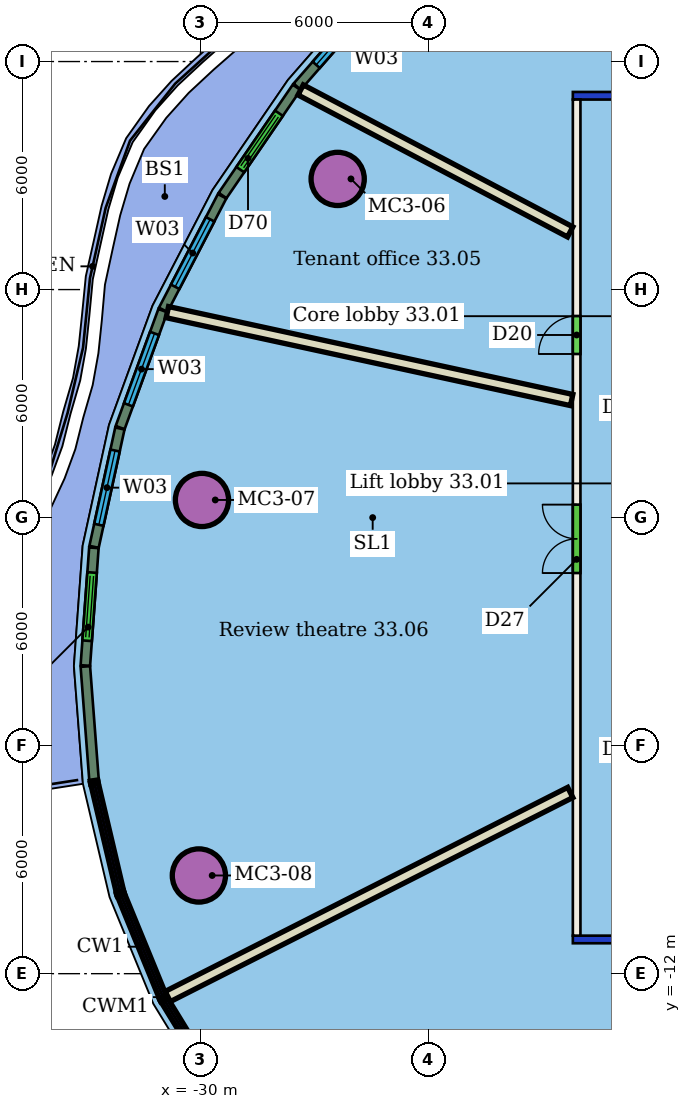
"""IFC4 building model, lengths in metres.
Left out: names, types, materials, properties, quantities, classifications, styles, units other than length and angle.
Written with IfcOpenShell. Run it as: python <this file> out.ifc"""

import sys

from ifc_helpers import new_model, si_unit, direction, frame, frame_2d, origin, origin_2d, place, context, subcontext, project, spatial, rectangle, hollow_circle, extrude, element, fill, save


model = new_model("IFC4")
c1 = context("Model", 3, precision=1e-05, world=origin(), true_north=direction((0.0, 1.0)))
c2 = subcontext(c1, "Body", "Model", "MODEL_VIEW")
j1 = project(units=[si_unit("LENGTHUNIT", "METRE"), si_unit("PLANEANGLEUNIT", "RADIAN")], contexts=[c1])
p1 = place(None, origin())
s1 = spatial("IfcSite", under=j1, at=p1, CompositionType="ELEMENT")
p2 = place(p1, origin())
s2 = spatial("IfcBuilding", under=s1, at=p2, CompositionType="ELEMENT")
p3 = place(p2, frame((0.0, 0.0, 143.4)))
s3 = spatial("IfcBuildingStorey", under=s2, at=p3, CompositionType="ELEMENT", Elevation=143.4)
for number, where, z_axis, x_axis in (
    (1, (-26.388, 8.912, 0.0), (0.0, 0.0, 1.0), (1.0, 0.0, 0.0)),
    (2, (-29.959, 0.464, 0.0), (0.0, 0.0, 1.0), (1.0, 0.0, 0.0)),
    (3, (-30.041, -9.417, 0.0), (0.0, 0.0, 1.0), (1.0, 0.0, 0.0)),
):
    element("IfcColumn", number, at=place(p3, frame(where, z_axis=z_axis, x_axis=x_axis)), inside=s3, PredefinedType="COLUMN", context=c2, shape_type="SweptSolid", body=[
        extrude(hollow_circle(Radius=0.7, WallThickness=0.05, at=origin_2d()), origin(), (0.0, 0.0, 1.0), 3.45),
    ])
p4 = place(p3, frame((8.2, -11.1, 0.0), z_axis=(0.0, 0.0, 1.0), x_axis=(-1.0, 0.0, 0.0)))
e4 = element("IfcWall", 4, at=p4, inside=s3, PredefinedType="PARTITIONING", context=c2, shape_type="SweptSolid", body=[
    extrude(rectangle(XDim=28.4, YDim=0.2, at=frame_2d((14.2, 0.0))), origin(), (0.0, 0.0, 1.0), 3.05),
])
p5 = place(p4, frame((22.856, 0.0, 0.0)))
e5 = element("IfcOpeningElement", 5, at=p5, cuts=e4, PredefinedType="OPENING", context=c2, shape_type="SweptSolid", body=[
    extrude(rectangle(XDim=1.8, YDim=2.1, at=frame_2d((0.9, 1.05))), frame((0.0, 0.11, 0.0), z_axis=(0.0, -1.0, 0.0), x_axis=(1.0, 0.0, 0.0)), (0.0, 0.0, 1.0), 0.22),
])
p6 = place(p4, frame((17.594, 0.0, 0.0)))
e6 = element("IfcOpeningElement", 6, at=p6, cuts=e4, PredefinedType="OPENING", context=c2, shape_type="SweptSolid", body=[
    extrude(rectangle(XDim=0.9, YDim=2.1, at=frame_2d((0.45, 1.05))), frame((0.0, 0.11, 0.0), z_axis=(0.0, -1.0, 0.0), x_axis=(1.0, 0.0, 0.0)), (0.0, 0.0, 1.0), 0.22),
])
p7 = place(p4, frame((7.819, 0.0, 0.0)))
e7 = element("IfcOpeningElement", 7, at=p7, cuts=e4, PredefinedType="OPENING", context=c2, shape_type="SweptSolid", body=[
    extrude(rectangle(XDim=1.2, YDim=2.1, at=frame_2d((0.6, 1.05))), frame((0.0, 0.11, 0.0), z_axis=(0.0, -1.0, 0.0), x_axis=(1.0, 0.0, 0.0)), (0.0, 0.0, 1.0), 0.22),
])
p8 = place(p3, frame((-20.1, -11.0, 0.0), z_axis=(0.0, 0.0, 1.0), x_axis=(0.0, 1.0, 0.0)))
e8 = element("IfcWall", 8, at=p8, inside=s3, PredefinedType="PARTITIONING", context=c2, shape_type="SweptSolid", body=[
    extrude(rectangle(XDim=22.0, YDim=0.2, at=frame_2d((11.0, 0.0))), origin(), (0.0, 0.0, 1.0), 3.45),
])
p9 = place(p8, frame((15.305, 0.0, 0.0)))
e9 = element("IfcOpeningElement", 9, at=p9, cuts=e8, PredefinedType="OPENING", context=c2, shape_type="SweptSolid", body=[
    extrude(rectangle(XDim=1.0, YDim=2.1, at=frame_2d((0.5, 1.05))), frame((0.0, 0.11, 0.0), z_axis=(0.0, -1.0, 0.0), x_axis=(1.0, 0.0, 0.0)), (0.0, 0.0, 1.0), 0.22),
])
p10 = place(p8, frame((9.542, 0.0, 0.0)))
e10 = element("IfcOpeningElement", 10, at=p10, cuts=e8, PredefinedType="OPENING", context=c2, shape_type="SweptSolid", body=[
    extrude(rectangle(XDim=1.8, YDim=2.4, at=frame_2d((0.9, 1.2))), frame((0.0, 0.11, 0.0), z_axis=(0.0, -1.0, 0.0), x_axis=(1.0, 0.0, 0.0)), (0.0, 0.0, 1.0), 0.22),
])
p11 = place(p3, frame((-20.2, 11.1, 0.0), z_axis=(0.0, 0.0, 1.0), x_axis=(1.0, 0.0, 0.0)))
e11 = element("IfcWall", 11, at=p11, inside=s3, PredefinedType="PARTITIONING", context=c2, shape_type="SweptSolid", body=[
    extrude(rectangle(XDim=28.4, YDim=0.2, at=frame_2d((14.2, 0.0))), origin(), (0.0, 0.0, 1.0), 3.05),
])
p12 = place(p11, frame((20.641, 0.0, 0.0)))
e12 = element("IfcOpeningElement", 12, at=p12, cuts=e11, PredefinedType="OPENING", context=c2, shape_type="SweptSolid", body=[
    extrude(rectangle(XDim=1.1, YDim=2.1, at=frame_2d((0.55, 1.05))), frame((0.0, 0.11, 0.0), z_axis=(0.0, -1.0, 0.0), x_axis=(1.0, 0.0, 0.0)), (0.0, 0.0, 1.0), 0.22),
])
p13 = place(p11, frame((12.589, 0.0, 0.0)))
e13 = element("IfcOpeningElement", 13, at=p13, cuts=e11, PredefinedType="OPENING", context=c2, shape_type="SweptSolid", body=[
    extrude(rectangle(XDim=1.0, YDim=2.1, at=frame_2d((0.5, 1.05))), frame((0.0, 0.11, 0.0), z_axis=(0.0, -1.0, 0.0), x_axis=(1.0, 0.0, 0.0)), (0.0, 0.0, 1.0), 0.22),
])
p14 = place(p11, frame((8.211, 0.0, 0.0)))
e14 = element("IfcOpeningElement", 14, at=p14, cuts=e11, PredefinedType="OPENING", context=c2, shape_type="SweptSolid", body=[
    extrude(rectangle(XDim=1.2, YDim=2.1, at=frame_2d((0.6, 1.05))), frame((0.0, 0.11, 0.0), z_axis=(0.0, -1.0, 0.0), x_axis=(1.0, 0.0, 0.0)), (0.0, 0.0, 1.0), 0.22),
])
p15 = place(p11, frame((3.191, 0.0, 0.0)))
e15 = element("IfcOpeningElement", 15, at=p15, cuts=e11, PredefinedType="OPENING", context=c2, shape_type="SweptSolid", body=[
    extrude(rectangle(XDim=1.2, YDim=2.1, at=frame_2d((0.6, 1.05))), frame((0.0, 0.11, 0.0), z_axis=(0.0, -1.0, 0.0), x_axis=(1.0, 0.0, 0.0)), (0.0, 0.0, 1.0), 0.22),
])
p16 = place(p3, frame((-19.456, 18.479, 0.0), z_axis=(0.0, 0.0, 1.0), x_axis=(0.588675883511, -0.808369163299, 0.0)))
e16 = element("IfcWall", 16, at=p16, inside=s3, PredefinedType="PARTITIONING", context=c2, shape_type="SweptSolid", body=[
    extrude(rectangle(XDim=8.895, YDim=0.3, at=frame_2d((4.447, 0.0))), origin(), (0.0, 0.0, 1.0), 3.45),
])
p17 = place(p3, frame((-27.362, 11.254, 0.0), z_axis=(0.0, 0.0, 1.0), x_axis=(0.884735817221, -0.466092838098, 0.0)))
e17 = element("IfcWall", 17, at=p17, inside=s3, PredefinedType="PARTITIONING", context=c2, shape_type="SweptSolid", body=[
    extrude(rectangle(XDim=8.016, YDim=0.3, at=frame_2d((4.008, 0.0))), origin(), (0.0, 0.0, 1.0), 3.45),
])
p18 = place(p3, frame((-30.87, 5.406, 0.0), z_axis=(0.0, 0.0, 1.0), x_axis=(0.977175554344, -0.21243336836, 0.0)))
e18 = element("IfcWall", 18, at=p18, inside=s3, PredefinedType="PARTITIONING", context=c2, shape_type="SweptSolid", body=[
    extrude(rectangle(XDim=10.887, YDim=0.3, at=frame_2d((5.443, 0.0))), origin(), (0.0, 0.0, 1.0), 3.45),
])
p19 = place(p3, frame((-30.86, -12.601, 0.0), z_axis=(0.0, 0.0, 1.0), x_axis=(0.891954750919, 0.452124675629, 0.0)))
e19 = element("IfcWall", 19, at=p19, inside=s3, PredefinedType="PARTITIONING", context=c2, shape_type="SweptSolid", body=[
    extrude(rectangle(XDim=11.875, YDim=0.3, at=frame_2d((5.938, 0.0))), origin(), (0.0, 0.0, 1.0), 3.45),
])
p20 = place(p3, frame((-19.496, -22.34, 0.0), z_axis=(0.0, 0.0, 1.0), x_axis=(0.51707886648, 0.855937758157, 0.0)))
e20 = element("IfcWall", 20, at=p20, inside=s3, PredefinedType="PARTITIONING", context=c2, shape_type="SweptSolid", body=[
    extrude(rectangle(XDim=12.97, YDim=0.15, at=frame_2d((6.485, 0.0))), origin(), (0.0, 0.0, 1.0), 3.45),
])
p21 = place(p3, frame((-25.136, 13.993, 0.0), z_axis=(0.0, 0.0, 1.0), x_axis=(-0.657606469368, -0.753361620634, 0.0)))
e21 = element("IfcWall", 21, at=p21, inside=s3, PredefinedType="SOLIDWALL", context=c2, shape_type="SweptSolid", body=[
    extrude(rectangle(XDim=3.524, YDim=0.25, at=frame_2d((1.762, 0.0))), origin(), (0.0, 0.0, 1.0), 3.1),
])
p22 = place(p21, frame((0.762, 0.0, 0.9)))
e22 = element("IfcOpeningElement", 22, at=p22, cuts=e21, PredefinedType="OPENING", context=c2, shape_type="SweptSolid", body=[
    extrude(rectangle(XDim=2.0, YDim=2.1, at=frame_2d((1.0, 1.05))), frame((0.0, 0.135, 0.0), z_axis=(0.0, -1.0, 0.0), x_axis=(1.0, 0.0, 0.0)), (0.0, 0.0, 1.0), 0.27),
])
p23 = place(p3, frame((-27.468, 11.321, 0.0), z_axis=(0.0, 0.0, 1.0), x_axis=(-0.565221630216, -0.824939093956, 0.0)))
e23 = element("IfcWall", 23, at=p23, inside=s3, PredefinedType="SOLIDWALL", context=c2, shape_type="SweptSolid", body=[
    extrude(rectangle(XDim=3.45, YDim=0.25, at=frame_2d((1.725, 0.0))), origin(), (0.0, 0.0, 1.0), 3.1),
])
p24 = place(p23, frame((0.825, 0.0, 0.0)))
e24 = element("IfcOpeningElement", 24, at=p24, cuts=e23, PredefinedType="OPENING", context=c2, shape_type="SweptSolid", body=[
    extrude(rectangle(XDim=1.8, YDim=2.4, at=frame_2d((0.9, 1.2))), frame((0.0, 0.135, 0.0), z_axis=(0.0, -1.0, 0.0), x_axis=(1.0, 0.0, 0.0)), (0.0, 0.0, 1.0), 0.27),
])
p25 = place(p3, frame((-29.429, 8.455, 0.0), z_axis=(0.0, 0.0, 1.0), x_axis=(-0.460482311848, -0.887668879975, 0.0)))
e25 = element("IfcWall", 25, at=p25, inside=s3, PredefinedType="SOLIDWALL", context=c2, shape_type="SweptSolid", body=[
    extrude(rectangle(XDim=3.366, YDim=0.25, at=frame_2d((1.683, 0.0))), origin(), (0.0, 0.0, 1.0), 3.1),
])
p26 = place(p25, frame((0.683, 0.0, 0.9)))
e26 = element("IfcOpeningElement", 26, at=p26, cuts=e25, PredefinedType="OPENING", context=c2, shape_type="SweptSolid", body=[
    extrude(rectangle(XDim=2.0, YDim=2.1, at=frame_2d((1.0, 1.05))), frame((0.0, 0.135, 0.0), z_axis=(0.0, -1.0, 0.0), x_axis=(1.0, 0.0, 0.0)), (0.0, 0.0, 1.0), 0.27),
])
p27 = place(p3, frame((-30.989, 5.446, 0.0), z_axis=(0.0, 0.0, 1.0), x_axis=(-0.343106975728, -0.939296334075, 0.0)))
e27 = element("IfcWall", 27, at=p27, inside=s3, PredefinedType="SOLIDWALL", context=c2, shape_type="SweptSolid", body=[
    extrude(rectangle(XDim=3.276, YDim=0.25, at=frame_2d((1.638, 0.0))), origin(), (0.0, 0.0, 1.0), 3.1),
])
p28 = place(p27, frame((0.638, 0.0, 0.9)))
e28 = element("IfcOpeningElement", 28, at=p28, cuts=e27, PredefinedType="OPENING", context=c2, shape_type="SweptSolid", body=[
    extrude(rectangle(XDim=2.0, YDim=2.1, at=frame_2d((1.0, 1.05))), frame((0.0, 0.135, 0.0), z_axis=(0.0, -1.0, 0.0), x_axis=(1.0, 0.0, 0.0)), (0.0, 0.0, 1.0), 0.27),
])
p29 = place(p3, frame((-32.12, 2.344, 0.0), z_axis=(0.0, 0.0, 1.0), x_axis=(-0.213278759663, -0.976991387207, 0.0)))
e29 = element("IfcWall", 29, at=p29, inside=s3, PredefinedType="SOLIDWALL", context=c2, shape_type="SweptSolid", body=[
    extrude(rectangle(XDim=3.187, YDim=0.25, at=frame_2d((1.593, 0.0))), origin(), (0.0, 0.0, 1.0), 3.1),
])
p30 = place(p29, frame((0.594, 0.0, 0.9)))
e30 = element("IfcOpeningElement", 30, at=p30, cuts=e29, PredefinedType="OPENING", context=c2, shape_type="SweptSolid", body=[
    extrude(rectangle(XDim=2.0, YDim=2.1, at=frame_2d((1.0, 1.05))), frame((0.0, 0.135, 0.0), z_axis=(0.0, -1.0, 0.0), x_axis=(1.0, 0.0, 0.0)), (0.0, 0.0, 1.0), 0.27),
])
p31 = place(p3, frame((-32.803, -0.794, 0.0), z_axis=(0.0, 0.0, 1.0), x_axis=(-0.072576937858, -0.997362816678, 0.0)))
e31 = element("IfcWall", 31, at=p31, inside=s3, PredefinedType="SOLIDWALL", context=c2, shape_type="SweptSolid", body=[
    extrude(rectangle(XDim=3.105, YDim=0.25, at=frame_2d((1.552, 0.0))), origin(), (0.0, 0.0, 1.0), 3.1),
])
p32 = place(p31, frame((0.652, 0.0, 0.0)))
e32 = element("IfcOpeningElement", 32, at=p32, cuts=e31, PredefinedType="OPENING", context=c2, shape_type="SweptSolid", body=[
    extrude(rectangle(XDim=1.8, YDim=2.4, at=frame_2d((0.9, 1.2))), frame((0.0, 0.135, 0.0), z_axis=(0.0, -1.0, 0.0), x_axis=(1.0, 0.0, 0.0)), (0.0, 0.0, 1.0), 0.27),
])
p33 = place(p3, frame((-33.028, -3.918, 0.0), z_axis=(0.0, 0.0, 1.0), x_axis=(0.076384798739, -0.997078413427, 0.0)))
e33 = element("IfcWall", 33, at=p33, inside=s3, PredefinedType="SOLIDWALL", context=c2, shape_type="SweptSolid", body=[
    extrude(rectangle(XDim=2.995, YDim=0.25, at=frame_2d((1.498, 0.0))), origin(), (0.0, 0.0, 1.0), 3.1),
])
p34 = place(p9, origin())
e34 = element("IfcDoor", 34, at=p34, inside=s3, OperationType="SINGLE_SWING_LEFT", PredefinedType="DOOR", context=c2, shape_type="SweptSolid", body=[
    extrude(rectangle(XDim=1.0, YDim=2.1, at=frame_2d((0.5, 1.05))), frame((0.0, 0.025, 0.0), z_axis=(0.0, -1.0, 0.0), x_axis=(1.0, 0.0, 0.0)), (0.0, 0.0, 1.0), 0.05),
])
fill(e9, e34)
p35 = place(p10, origin())
e35 = element("IfcDoor", 35, at=p35, inside=s3, OperationType="DOUBLE_DOOR_SINGLE_SWING", PredefinedType="DOOR", context=c2, shape_type="SweptSolid", body=[
    extrude(rectangle(XDim=1.8, YDim=2.4, at=frame_2d((0.9, 1.2))), frame((0.0, 0.025, 0.0), z_axis=(0.0, -1.0, 0.0), x_axis=(1.0, 0.0, 0.0)), (0.0, 0.0, 1.0), 0.05),
])
fill(e10, e35)
p36 = place(p22, origin())
e36 = element("IfcWindow", 36, at=p36, inside=s3, PartitioningType="SINGLE_PANEL", PredefinedType="WINDOW", context=c2, shape_type="SweptSolid", body=[
    extrude(rectangle(XDim=2.0, YDim=2.1, at=frame_2d((1.0, 1.05))), frame((0.0, 0.03, 0.0), z_axis=(0.0, -1.0, 0.0), x_axis=(1.0, 0.0, 0.0)), (0.0, 0.0, 1.0), 0.06),
])
fill(e22, e36)
p37 = place(p24, origin())
e37 = element("IfcDoor", 37, at=p37, inside=s3, OperationType="DOUBLE_DOOR_SLIDING", PredefinedType="DOOR", context=c2, shape_type="SweptSolid", body=[
    extrude(rectangle(XDim=1.8, YDim=2.4, at=frame_2d((0.9, 1.2))), frame((0.0, 0.025, 0.0), z_axis=(0.0, -1.0, 0.0), x_axis=(1.0, 0.0, 0.0)), (0.0, 0.0, 1.0), 0.05),
])
fill(e24, e37)
p38 = place(p26, origin())
e38 = element("IfcWindow", 38, at=p38, inside=s3, PartitioningType="SINGLE_PANEL", PredefinedType="WINDOW", context=c2, shape_type="SweptSolid", body=[
    extrude(rectangle(XDim=2.0, YDim=2.1, at=frame_2d((1.0, 1.05))), frame((0.0, 0.03, 0.0), z_axis=(0.0, -1.0, 0.0), x_axis=(1.0, 0.0, 0.0)), (0.0, 0.0, 1.0), 0.06),
])
fill(e26, e38)
p39 = place(p28, origin())
e39 = element("IfcWindow", 39, at=p39, inside=s3, PartitioningType="SINGLE_PANEL", PredefinedType="WINDOW", context=c2, shape_type="SweptSolid", body=[
    extrude(rectangle(XDim=2.0, YDim=2.1, at=frame_2d((1.0, 1.05))), frame((0.0, 0.03, 0.0), z_axis=(0.0, -1.0, 0.0), x_axis=(1.0, 0.0, 0.0)), (0.0, 0.0, 1.0), 0.06),
])
fill(e28, e39)
p40 = place(p30, origin())
e40 = element("IfcWindow", 40, at=p40, inside=s3, PartitioningType="SINGLE_PANEL", PredefinedType="WINDOW", context=c2, shape_type="SweptSolid", body=[
    extrude(rectangle(XDim=2.0, YDim=2.1, at=frame_2d((1.0, 1.05))), frame((0.0, 0.03, 0.0), z_axis=(0.0, -1.0, 0.0), x_axis=(1.0, 0.0, 0.0)), (0.0, 0.0, 1.0), 0.06),
])
fill(e30, e40)
p41 = place(p32, origin())
e41 = element("IfcDoor", 41, at=p41, inside=s3, OperationType="DOUBLE_DOOR_SLIDING", PredefinedType="DOOR", context=c2, shape_type="SweptSolid", body=[
    extrude(rectangle(XDim=1.8, YDim=2.4, at=frame_2d((0.9, 1.2))), frame((0.0, 0.025, 0.0), z_axis=(0.0, -1.0, 0.0), x_axis=(1.0, 0.0, 0.0)), (0.0, 0.0, 1.0), 0.05),
])
fill(e32, e41)
save(model, sys.argv[1])
